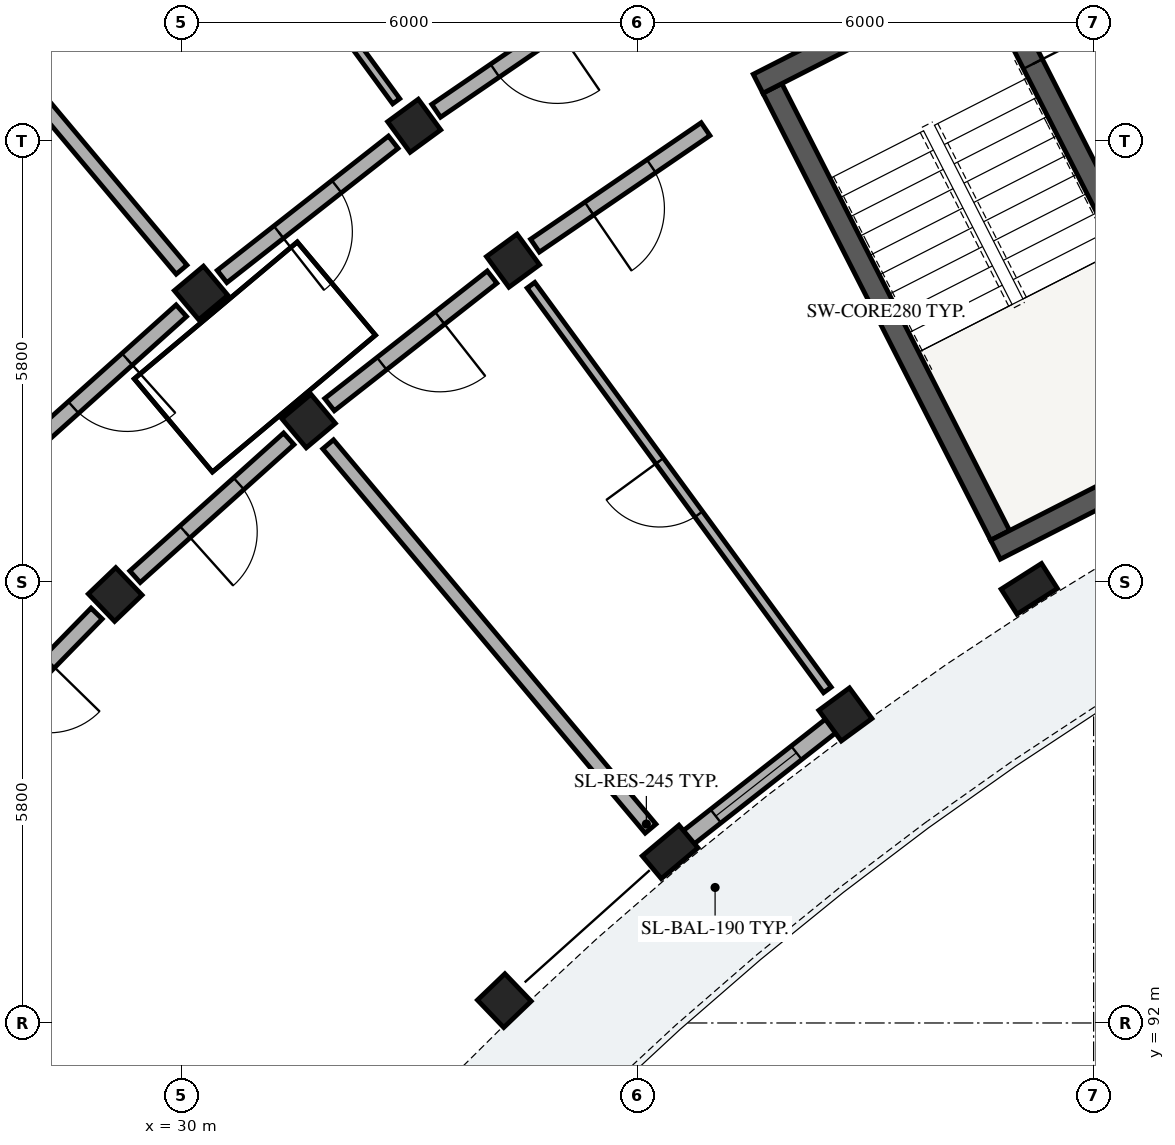
"""IFC4 building model, lengths in metres.
Left out: names, types, materials, properties, quantities, classifications, styles, units other than length and angle.
Written with IfcOpenShell. Run it as: python <this file> out.ifc"""

import sys

from ifc_helpers import new_model, si_unit, direction, frame, frame_2d, origin, origin_2d, place, context, subcontext, project, spatial, rectangle, extrude, element, fill, save


model = new_model("IFC4")
c1 = context("Model", 3, precision=1e-05, world=origin(), true_north=direction((0.0, 1.0)))
c2 = subcontext(c1, "Body", "Model", "MODEL_VIEW")
j1 = project(units=[si_unit("LENGTHUNIT", "METRE"), si_unit("PLANEANGLEUNIT", "RADIAN")], contexts=[c1])
p1 = place(None, origin())
s1 = spatial("IfcSite", under=j1, at=p1, CompositionType="ELEMENT")
p2 = place(p1, origin())
s2 = spatial("IfcBuilding", under=s1, at=p2, CompositionType="ELEMENT")
p3 = place(p2, frame((0.0, 0.0, 32.36)))
s3 = spatial("IfcBuildingStorey", under=s2, at=p3, CompositionType="ELEMENT", Elevation=32.36)
p4 = place(p3, frame((37.773, 104.296, 0.0), z_axis=(0.0, 0.0, 1.0), x_axis=(0.453992276384, -0.891005618941, 0.0)))
e1 = element("IfcWall", 1, at=p4, inside=s3, PredefinedType="SHEAR", context=c2, shape_type="SweptSolid", body=[
    extrude(rectangle(XDim=6.6, YDim=0.28, at=frame_2d((3.3, 0.0))), origin(), (0.0, 0.0, 1.0), 3.11),
])
for number, where, z_axis, x_axis in (
    (2, (40.709, 98.227, 0.0), (0.0, 0.0, 1.0), (0.891, 0.454, 0.0)),
    (3, (37.585, 104.357, 0.0), (0.0, 0.0, 1.0), (0.891, 0.454, 0.0)),
):
    element("IfcWall", number, at=place(p3, frame(where, z_axis=z_axis, x_axis=x_axis)), inside=s3, PredefinedType="SHEAR", context=c2, shape_type="SweptSolid", body=[
        extrude(rectangle(XDim=3.48, YDim=0.28, at=frame_2d((1.74, 0.0))), origin(), (0.0, 0.0, 1.0), 3.11),
    ])
p5 = place(p3, frame((40.625, 105.748, 0.0), z_axis=(0.0, 0.0, 1.0), x_axis=(0.453992276384, -0.891005618941, 0.0)))
e4 = element("IfcWall", 4, at=p5, inside=s3, PredefinedType="SHEAR", context=c2, shape_type="SweptSolid", body=[
    extrude(rectangle(XDim=6.6, YDim=0.28, at=frame_2d((3.3, 0.0))), origin(), (0.0, 0.0, 1.0), 3.11),
])
p6 = place(p5, frame((0.22, 0.0, 0.0)))
e5 = element("IfcOpeningElement", 5, at=p6, cuts=e4, PredefinedType="OPENING", context=c2, shape_type="SweptSolid", body=[
    extrude(rectangle(XDim=1.05, YDim=2.15, at=frame_2d((0.525, 1.075))), frame((0.0, 0.15, 0.0), z_axis=(0.0, -1.0, 0.0), x_axis=(1.0, 0.0, 0.0)), (0.0, 0.0, 1.0), 0.3),
])
p7 = place(p3, frame((41.153, 97.712, 0.0), z_axis=(0.0, 0.0, 1.0), x_axis=(-0.536481603385, 0.843912015099, 0.0)))
e6 = element("IfcColumn", 6, at=p7, inside=s3, PredefinedType="PILASTER", context=c2, shape_type="SweptSolid", body=[
    extrude(rectangle(XDim=0.39, YDim=0.63, at=origin_2d()), origin(), (0.0, 0.0, 1.0), 3.115),
])
for number, where, z_axis, x_axis in (
    (7, (38.734, 96.059, 0.0), (0.0, 0.0, 1.0), (-0.591, 0.807, 0.0)),
    (8, (34.361, 102.029, 0.0), (0.0, 0.0, 1.0), (-0.591, 0.807, 0.0)),
    (9, (33.061, 103.804, 0.0), (0.0, 0.0, 1.0), (-0.591, 0.807, 0.0)),
):
    element("IfcColumn", number, at=place(p3, frame(where, z_axis=z_axis, x_axis=x_axis)), inside=s3, PredefinedType="COLUMN", context=c2, shape_type="SweptSolid", body=[
        extrude(rectangle(XDim=0.5, YDim=0.5, at=origin_2d()), origin(), (0.0, 0.0, 1.0), 3.115),
    ])
p8 = place(p3, frame((36.428, 94.251, 0.0), z_axis=(0.0, 0.0, 1.0), x_axis=(-0.642787636427, 0.766044420681, 0.0)))
e10 = element("IfcColumn", 10, at=p8, inside=s3, PredefinedType="PILASTER", context=c2, shape_type="SweptSolid", body=[
    extrude(rectangle(XDim=0.39, YDim=0.63, at=origin_2d()), origin(), (0.0, 0.0, 1.0), 3.115),
])
for number, where, z_axis, x_axis in (
    (11, (31.671, 99.919, 0.0), (0.0, 0.0, 1.0), (-0.643, 0.766, 0.0)),
    (12, (30.257, 101.605, 0.0), (0.0, 0.0, 1.0), (-0.643, 0.766, 0.0)),
    (13, (34.247, 92.294, 0.0), (0.0, 0.0, 1.0), (-0.692, 0.722, 0.0)),
    (14, (29.127, 97.637, 0.0), (0.0, 0.0, 1.0), (-0.692, 0.722, 0.0)),
):
    element("IfcColumn", number, at=place(p3, frame(where, z_axis=z_axis, x_axis=x_axis)), inside=s3, PredefinedType="COLUMN", context=c2, shape_type="SweptSolid", body=[
        extrude(rectangle(XDim=0.5, YDim=0.5, at=origin_2d()), origin(), (0.0, 0.0, 1.0), 3.115),
    ])
p9 = place(p3, frame((38.561, 95.923, 0.0), z_axis=(0.0, 0.0, 1.0), x_axis=(-0.786840630754, -0.617156237751, 0.0)))
e15 = element("IfcWall", 15, at=p9, inside=s3, PredefinedType="SOLIDWALL", context=c2, shape_type="SweptSolid", body=[
    extrude(rectangle(XDim=2.545, YDim=0.225, at=frame_2d((1.272, 0.0))), origin(), (0.0, 0.0, 1.0), 2.355),
])
p10 = place(p9, frame((0.598, 0.0, 0.35)))
e16 = element("IfcOpeningElement", 16, at=p10, cuts=e15, PredefinedType="OPENING", context=c2, shape_type="SweptSolid", body=[
    extrude(rectangle(XDim=1.35, YDim=1.65, at=frame_2d((0.675, 0.825))), frame((0.0, 0.123, 0.0), z_axis=(0.0, -1.0, 0.0), x_axis=(1.0, 0.0, 0.0)), (0.0, 0.0, 1.0), 0.245),
])
p11 = place(p3, frame((35.714, 105.616, 0.0), z_axis=(0.0, 0.0, 1.0), x_axis=(-0.825779671787, -0.563992848947, 0.0)))
e17 = element("IfcWall", 17, at=p11, inside=s3, PredefinedType="PARTITIONING", context=c2, shape_type="SweptSolid", body=[
    extrude(rectangle(XDim=2.863, YDim=0.205, at=frame_2d((1.432, 0.0))), origin(), (0.0, 0.0, 1.0), 2.37),
])
p12 = place(p11, frame((0.937, 0.0, 0.0)))
e18 = element("IfcOpeningElement", 18, at=p12, cuts=e17, PredefinedType="OPENING", context=c2, shape_type="SweptSolid", body=[
    extrude(rectangle(XDim=0.99, YDim=2.16, at=frame_2d((0.495, 1.08))), frame((0.0, 0.113, 0.0), z_axis=(0.0, -1.0, 0.0), x_axis=(1.0, 0.0, 0.0)), (0.0, 0.0, 1.0), 0.225),
])
p13 = place(p3, frame((36.895, 103.76, 0.0), z_axis=(0.0, 0.0, 1.0), x_axis=(-0.825752009056, -0.56403334967, 0.0)))
e19 = element("IfcWall", 19, at=p13, inside=s3, PredefinedType="PARTITIONING", context=c2, shape_type="SweptSolid", body=[
    extrude(rectangle(XDim=2.718, YDim=0.205, at=frame_2d((1.359, 0.0))), origin(), (0.0, 0.0, 1.0), 2.37),
])
p14 = place(p13, frame((0.864, 0.0, 0.0)))
e20 = element("IfcOpeningElement", 20, at=p14, cuts=e19, PredefinedType="OPENING", context=c2, shape_type="SweptSolid", body=[
    extrude(rectangle(XDim=0.99, YDim=2.16, at=frame_2d((0.495, 1.08))), frame((0.0, 0.113, 0.0), z_axis=(0.0, -1.0, 0.0), x_axis=(1.0, 0.0, 0.0)), (0.0, 0.0, 1.0), 0.225),
])
p15 = place(p3, frame((32.824, 104.126, 0.0), z_axis=(0.0, 0.0, 1.0), x_axis=(-0.590910940129, 0.806736797745, 0.0)))
e21 = element("IfcWall", 21, at=p15, inside=s3, PredefinedType="PARTITIONING", context=c2, shape_type="SweptSolid", body=[
    extrude(rectangle(XDim=4.7, YDim=0.115, at=frame_2d((2.35, 0.0))), origin(), (0.0, 0.0, 1.0), 2.37),
])
p16 = place(p15, frame((1.905, 0.0, 0.0)))
e22 = element("IfcOpeningElement", 22, at=p16, cuts=e21, PredefinedType="OPENING", context=c2, shape_type="SweptSolid", body=[
    extrude(rectangle(XDim=0.89, YDim=2.1, at=frame_2d((0.445, 1.05))), frame((0.0, 0.067, 0.0), z_axis=(0.0, -1.0, 0.0), x_axis=(1.0, 0.0, 0.0)), (0.0, 0.0, 1.0), 0.135),
])
p17 = place(p3, frame((38.497, 96.382, 0.0), z_axis=(0.0, 0.0, 1.0), x_axis=(-0.590924179316, 0.806727100263, 0.0)))
e23 = element("IfcWall", 23, at=p17, inside=s3, PredefinedType="PARTITIONING", context=c2, shape_type="SweptSolid", body=[
    extrude(rectangle(XDim=6.6, YDim=0.125, at=frame_2d((3.3, 0.0))), origin(), (0.0, 0.0, 1.0), 2.37),
])
p18 = place(p17, frame((2.865, 0.0, 0.0)))
e24 = element("IfcOpeningElement", 24, at=p18, cuts=e23, PredefinedType="OPENING", context=c2, shape_type="SweptSolid", body=[
    extrude(rectangle(XDim=0.87, YDim=2.08, at=frame_2d((0.435, 1.04))), frame((0.0, 0.073, 0.0), z_axis=(0.0, -1.0, 0.0), x_axis=(1.0, 0.0, 0.0)), (0.0, 0.0, 1.0), 0.145),
])
p19 = place(p3, frame((32.785, 103.588, 0.0), z_axis=(0.0, 0.0, 1.0), x_axis=(-0.786806323554, -0.617199975061, 0.0)))
e25 = element("IfcWall", 25, at=p19, inside=s3, PredefinedType="PARTITIONING", context=c2, shape_type="SweptSolid", body=[
    extrude(rectangle(XDim=2.863, YDim=0.205, at=frame_2d((1.432, 0.0))), origin(), (0.0, 0.0, 1.0), 2.37),
])
p20 = place(p19, frame((0.947, 0.0, 0.0)))
e26 = element("IfcOpeningElement", 26, at=p20, cuts=e25, PredefinedType="OPENING", context=c2, shape_type="SweptSolid", body=[
    extrude(rectangle(XDim=0.97, YDim=2.15, at=frame_2d((0.485, 1.075))), frame((0.0, 0.113, 0.0), z_axis=(0.0, -1.0, 0.0), x_axis=(1.0, 0.0, 0.0)), (0.0, 0.0, 1.0), 0.225),
])
p21 = place(p3, frame((34.085, 101.813, 0.0), z_axis=(0.0, 0.0, 1.0), x_axis=(-0.786835457019, -0.617162833924, 0.0)))
e27 = element("IfcWall", 27, at=p21, inside=s3, PredefinedType="PARTITIONING", context=c2, shape_type="SweptSolid", body=[
    extrude(rectangle(XDim=2.718, YDim=0.205, at=frame_2d((1.359, 0.0))), origin(), (0.0, 0.0, 1.0), 2.37),
])
p22 = place(p21, frame((0.874, 0.0, 0.0)))
e28 = element("IfcOpeningElement", 28, at=p22, cuts=e27, PredefinedType="OPENING", context=c2, shape_type="SweptSolid", body=[
    extrude(rectangle(XDim=0.97, YDim=2.15, at=frame_2d((0.485, 1.075))), frame((0.0, 0.113, 0.0), z_axis=(0.0, -1.0, 0.0), x_axis=(1.0, 0.0, 0.0)), (0.0, 0.0, 1.0), 0.225),
])
p23 = place(p3, frame((30.0, 101.911, 0.0), z_axis=(0.0, 0.0, 1.0), x_axis=(-0.642811926223, 0.766024038465, 0.0)))
e29 = element("IfcWall", 29, at=p23, inside=s3, PredefinedType="PARTITIONING", context=c2, shape_type="SweptSolid", body=[
    extrude(rectangle(XDim=4.7, YDim=0.185, at=frame_2d((2.35, 0.0))), origin(), (0.0, 0.0, 1.0), 2.37),
])
p24 = place(p3, frame((36.171, 94.557, 0.0), z_axis=(0.0, 0.0, 1.0), x_axis=(-0.642789470807, 0.766042881449, 0.0)))
e30 = element("IfcWall", 30, at=p24, inside=s3, PredefinedType="PARTITIONING", context=c2, shape_type="SweptSolid", body=[
    extrude(rectangle(XDim=6.6, YDim=0.185, at=frame_2d((3.3, 0.0))), origin(), (0.0, 0.0, 1.0), 2.37),
])
p25 = place(p3, frame((29.997, 101.371, 0.0), z_axis=(0.0, 0.0, 1.0), x_axis=(-0.744433521088, -0.667696587291, 0.0)))
e31 = element("IfcWall", 31, at=p25, inside=s3, PredefinedType="PARTITIONING", context=c2, shape_type="SweptSolid", body=[
    extrude(rectangle(XDim=2.863, YDim=0.205, at=frame_2d((1.432, 0.0))), origin(), (0.0, 0.0, 1.0), 2.37),
])
p26 = place(p25, frame((0.957, 0.0, 0.0)))
e32 = element("IfcOpeningElement", 32, at=p26, cuts=e31, PredefinedType="OPENING", context=c2, shape_type="SweptSolid", body=[
    extrude(rectangle(XDim=0.95, YDim=2.13, at=frame_2d((0.475, 1.065))), frame((0.0, 0.113, 0.0), z_axis=(0.0, -1.0, 0.0), x_axis=(1.0, 0.0, 0.0)), (0.0, 0.0, 1.0), 0.225),
])
p27 = place(p3, frame((31.411, 99.686, 0.0), z_axis=(0.0, 0.0, 1.0), x_axis=(-0.744418559135, -0.667713268413, 0.0)))
e33 = element("IfcWall", 33, at=p27, inside=s3, PredefinedType="PARTITIONING", context=c2, shape_type="SweptSolid", body=[
    extrude(rectangle(XDim=2.718, YDim=0.205, at=frame_2d((1.359, 0.0))), origin(), (0.0, 0.0, 1.0), 2.37),
])
p28 = place(p27, frame((0.884, 0.0, 0.0)))
e34 = element("IfcOpeningElement", 34, at=p28, cuts=e33, PredefinedType="OPENING", context=c2, shape_type="SweptSolid", body=[
    extrude(rectangle(XDim=0.95, YDim=2.13, at=frame_2d((0.475, 1.065))), frame((0.0, 0.113, 0.0), z_axis=(0.0, -1.0, 0.0), x_axis=(1.0, 0.0, 0.0)), (0.0, 0.0, 1.0), 0.225),
])
p29 = place(p3, frame((28.882, 97.387, 0.0), z_axis=(0.0, 0.0, 1.0), x_axis=(-0.698840007829, -0.715278018296, 0.0)))
e35 = element("IfcWall", 35, at=p29, inside=s3, PredefinedType="PARTITIONING", context=c2, shape_type="SweptSolid", body=[
    extrude(rectangle(XDim=2.718, YDim=0.205, at=frame_2d((1.359, 0.0))), origin(), (0.0, 0.0, 1.0), 2.37),
])
p30 = place(p29, frame((0.894, 0.0, 0.0)))
e36 = element("IfcOpeningElement", 36, at=p30, cuts=e35, PredefinedType="OPENING", context=c2, shape_type="SweptSolid", body=[
    extrude(rectangle(XDim=0.93, YDim=2.12, at=frame_2d((0.465, 1.06))), frame((0.0, 0.113, 0.0), z_axis=(0.0, -1.0, 0.0), x_axis=(1.0, 0.0, 0.0)), (0.0, 0.0, 1.0), 0.225),
])
p31 = place(p10, origin())
e37 = element("IfcWindow", 37, at=p31, inside=s3, PartitioningType="SINGLE_PANEL", PredefinedType="WINDOW", context=c2, shape_type="SweptSolid", body=[
    extrude(rectangle(XDim=1.35, YDim=1.65, at=frame_2d((0.675, 0.825))), frame((0.0, 0.03, 0.0), z_axis=(0.0, -1.0, 0.0), x_axis=(1.0, 0.0, 0.0)), (0.0, 0.0, 1.0), 0.06),
])
fill(e16, e37)
p32 = place(p6, origin())
e38 = element("IfcDoor", 38, at=p32, inside=s3, OperationType="SINGLE_SWING_RIGHT", PredefinedType="DOOR", context=c2, shape_type="SweptSolid", body=[
    extrude(rectangle(XDim=1.05, YDim=2.15, at=frame_2d((0.525, 1.075))), frame((0.0, 0.025, 0.0), z_axis=(0.0, -1.0, 0.0), x_axis=(1.0, 0.0, 0.0)), (0.0, 0.0, 1.0), 0.05),
])
fill(e5, e38)
p33 = place(p12, origin())
e39 = element("IfcDoor", 39, at=p33, inside=s3, OperationType="SINGLE_SWING_LEFT", PredefinedType="DOOR", context=c2, shape_type="SweptSolid", body=[
    extrude(rectangle(XDim=0.99, YDim=2.16, at=frame_2d((0.495, 1.08))), frame((0.0, 0.025, 0.0), z_axis=(0.0, -1.0, 0.0), x_axis=(1.0, 0.0, 0.0)), (0.0, 0.0, 1.0), 0.05),
])
fill(e18, e39)
p34 = place(p14, origin())
e40 = element("IfcDoor", 40, at=p34, inside=s3, OperationType="SINGLE_SWING_RIGHT", PredefinedType="DOOR", context=c2, shape_type="SweptSolid", body=[
    extrude(rectangle(XDim=0.99, YDim=2.16, at=frame_2d((0.495, 1.08))), frame((0.0, 0.025, 0.0), z_axis=(0.0, -1.0, 0.0), x_axis=(1.0, 0.0, 0.0)), (0.0, 0.0, 1.0), 0.05),
])
fill(e20, e40)
p35 = place(p18, origin())
e41 = element("IfcDoor", 41, at=p35, inside=s3, OperationType="SINGLE_SWING_RIGHT", PredefinedType="DOOR", context=c2, shape_type="SweptSolid", body=[
    extrude(rectangle(XDim=0.87, YDim=2.08, at=frame_2d((0.435, 1.04))), frame((0.0, 0.025, 0.0), z_axis=(0.0, -1.0, 0.0), x_axis=(1.0, 0.0, 0.0)), (0.0, 0.0, 1.0), 0.05),
])
fill(e24, e41)
p36 = place(p20, origin())
e42 = element("IfcDoor", 42, at=p36, inside=s3, OperationType="SINGLE_SWING_RIGHT", PredefinedType="DOOR", context=c2, shape_type="SweptSolid", body=[
    extrude(rectangle(XDim=0.97, YDim=2.15, at=frame_2d((0.485, 1.075))), frame((0.0, 0.025, 0.0), z_axis=(0.0, -1.0, 0.0), x_axis=(1.0, 0.0, 0.0)), (0.0, 0.0, 1.0), 0.05),
])
fill(e26, e42)
p37 = place(p22, origin())
e43 = element("IfcDoor", 43, at=p37, inside=s3, OperationType="SINGLE_SWING_LEFT", PredefinedType="DOOR", context=c2, shape_type="SweptSolid", body=[
    extrude(rectangle(XDim=0.97, YDim=2.15, at=frame_2d((0.485, 1.075))), frame((0.0, 0.025, 0.0), z_axis=(0.0, -1.0, 0.0), x_axis=(1.0, 0.0, 0.0)), (0.0, 0.0, 1.0), 0.05),
])
fill(e28, e43)
p38 = place(p26, origin())
e44 = element("IfcDoor", 44, at=p38, inside=s3, OperationType="SINGLE_SWING_LEFT", PredefinedType="DOOR", context=c2, shape_type="SweptSolid", body=[
    extrude(rectangle(XDim=0.95, YDim=2.13, at=frame_2d((0.475, 1.065))), frame((0.0, 0.025, 0.0), z_axis=(0.0, -1.0, 0.0), x_axis=(1.0, 0.0, 0.0)), (0.0, 0.0, 1.0), 0.05),
])
fill(e32, e44)
p39 = place(p28, origin())
e45 = element("IfcDoor", 45, at=p39, inside=s3, OperationType="SINGLE_SWING_RIGHT", PredefinedType="DOOR", context=c2, shape_type="SweptSolid", body=[
    extrude(rectangle(XDim=0.95, YDim=2.13, at=frame_2d((0.475, 1.065))), frame((0.0, 0.025, 0.0), z_axis=(0.0, -1.0, 0.0), x_axis=(1.0, 0.0, 0.0)), (0.0, 0.0, 1.0), 0.05),
])
fill(e34, e45)
save(model, sys.argv[1])
